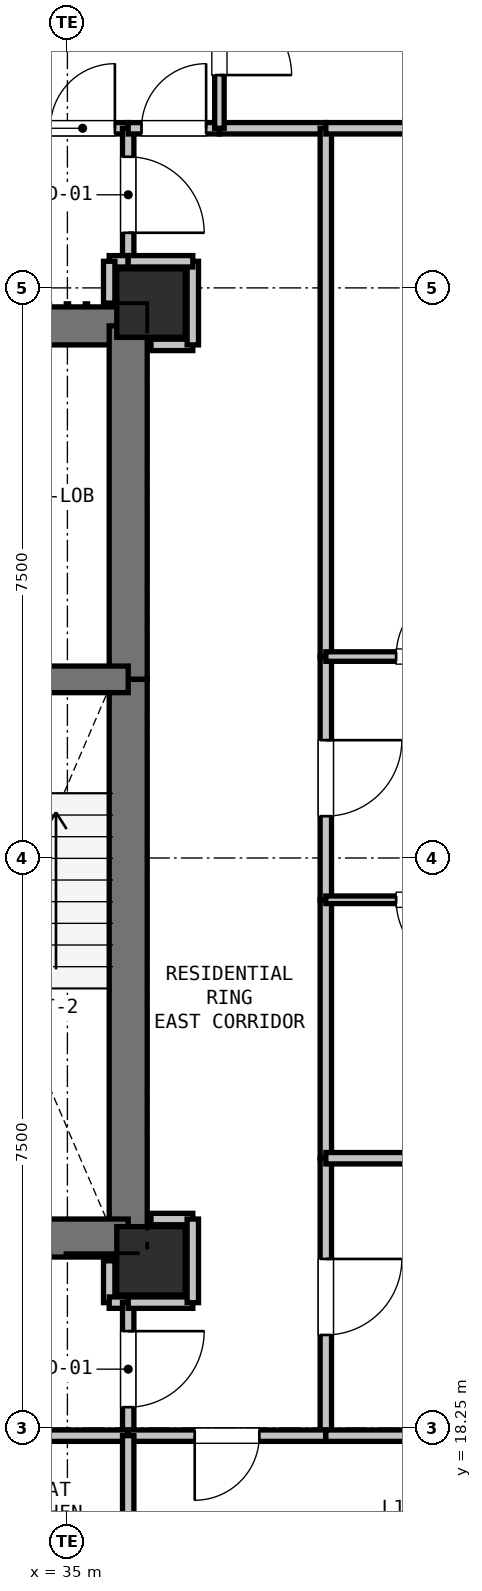
"""IFC4 building model, lengths in metres.
Left out: names, types, materials, properties, quantities, classifications, styles, units other than length and angle.
Written with IfcOpenShell. Run it as: python <this file> out.ifc"""

import sys

from ifc_helpers import new_model, si_unit, direction, frame, frame_2d, origin, origin_2d, place, context, subcontext, project, spatial, rectangle, extrude, element, fill, save


model = new_model("IFC4")
c1 = context("Model", 3, precision=1e-05, world=origin(), true_north=direction((0.0, 1.0)))
c2 = subcontext(c1, "Body", "Model", "MODEL_VIEW")
j1 = project(units=[si_unit("LENGTHUNIT", "METRE"), si_unit("PLANEANGLEUNIT", "RADIAN")], contexts=[c1])
p1 = place(None, origin())
s1 = spatial("IfcSite", under=j1, at=p1, CompositionType="ELEMENT")
p2 = place(p1, origin())
s2 = spatial("IfcBuilding", under=s1, at=p2, CompositionType="ELEMENT")
p3 = place(p2, frame((0.0, 0.0, 55.5)))
s3 = spatial("IfcBuildingStorey", under=s2, at=p3, CompositionType="ELEMENT", Elevation=55.5)
for number, where, z_axis, x_axis in (
    (1, (36.1, 33.05, 0.0), (0.0, 0.0, 1.0), (1.0, 0.0, 0.0)),
    (2, (36.1, 20.45, 0.0), (0.0, 0.0, 1.0), (1.0, 0.0, 0.0)),
):
    element("IfcColumn", number, at=place(p3, frame(where, z_axis=z_axis, x_axis=x_axis)), inside=s3, PredefinedType="COLUMN", context=c2, shape_type="SweptSolid", body=[
        extrude(rectangle(XDim=0.9, YDim=0.9, at=origin_2d()), origin(), (0.0, 0.0, 1.0), 3.3),
    ])
p4 = place(p3, frame((32.35, 32.75, 0.0), z_axis=(0.0, 0.0, 1.0), x_axis=(1.0, 0.0, 0.0)))
e3 = element("IfcWall", 3, at=p4, inside=s3, PredefinedType="SHEAR", context=c2, shape_type="SweptSolid", body=[
    extrude(rectangle(XDim=3.45, YDim=0.5, at=frame_2d((1.725, 0.0))), origin(), (0.0, 0.0, 1.0), 3.04),
])
p5 = place(p4, frame((0.65, 0.0, 0.0)))
e4 = element("IfcOpeningElement", 4, at=p5, cuts=e3, PredefinedType="OPENING", context=c2, shape_type="SweptSolid", body=[
    extrude(rectangle(XDim=1.15, YDim=2.15, at=frame_2d((0.575, 1.075))), frame((0.0, 0.26, 0.0), z_axis=(0.0, -1.0, 0.0), x_axis=(1.0, 0.0, 0.0)), (0.0, 0.0, 1.0), 0.52),
])
p6 = place(p3, frame((35.8, 32.75, 0.0), z_axis=(0.0, 0.0, 1.0), x_axis=(0.0, -1.0, 0.0)))
e5 = element("IfcWall", 5, at=p6, inside=s3, PredefinedType="SHEAR", context=c2, shape_type="SweptSolid", body=[
    extrude(rectangle(XDim=4.65, YDim=0.5, at=frame_2d((2.325, 0.0))), origin(), (0.0, 0.0, 1.0), 3.04),
])
p7 = place(p3, frame((35.8, 28.1, 0.0), z_axis=(0.0, 0.0, 1.0), x_axis=(0.0, -1.0, 0.0)))
e6 = element("IfcWall", 6, at=p7, inside=s3, PredefinedType="SHEAR", context=c2, shape_type="SweptSolid", body=[
    extrude(rectangle(XDim=7.35, YDim=0.5, at=frame_2d((3.675, 0.0))), origin(), (0.0, 0.0, 1.0), 3.04),
])
p8 = place(p3, frame((35.8, 20.75, 0.0), z_axis=(0.0, 0.0, 1.0), x_axis=(-1.0, 0.0, 0.0)))
e7 = element("IfcWall", 7, at=p8, inside=s3, PredefinedType="SHEAR", context=c2, shape_type="SweptSolid", body=[
    extrude(rectangle(XDim=3.45, YDim=0.5, at=frame_2d((1.725, 0.0))), origin(), (0.0, 0.0, 1.0), 3.04),
])
p9 = place(p3, frame((32.35, 28.1, 0.0), z_axis=(0.0, 0.0, 1.0), x_axis=(1.0, 0.0, 0.0)))
e8 = element("IfcWall", 8, at=p9, inside=s3, PredefinedType="SHEAR", context=c2, shape_type="SweptSolid", body=[
    extrude(rectangle(XDim=3.45, YDim=0.35, at=frame_2d((1.725, 0.0))), origin(), (0.0, 0.0, 1.0), 3.04),
])
p10 = place(p9, frame((1.15, 0.0, 0.0)))
e9 = element("IfcOpeningElement", 9, at=p10, cuts=e8, PredefinedType="OPENING", context=c2, shape_type="SweptSolid", body=[
    extrude(rectangle(XDim=1.15, YDim=2.15, at=frame_2d((0.575, 1.075))), frame((0.0, 0.185, 0.0), z_axis=(0.0, -1.0, 0.0), x_axis=(1.0, 0.0, 0.0)), (0.0, 0.0, 1.0), 0.37),
])
p11 = place(p3, frame((35.55, 20.45, 0.0), z_axis=(0.0, 0.0, 1.0), x_axis=(0.0, -1.0, 0.0)))
e10 = element("IfcWall", 10, at=p11, inside=s3, PredefinedType="PARTITIONING", context=c2, shape_type="SweptSolid", body=[
    extrude(rectangle(XDim=0.55, YDim=0.15, at=frame_2d((0.275, 0.0))), origin(), (0.0, 0.0, 1.0), 2.488),
])
p12 = place(p3, frame((35.55, 19.9, 0.0), z_axis=(0.0, 0.0, 1.0), x_axis=(1.0, 0.0, 0.0)))
e11 = element("IfcWall", 11, at=p12, inside=s3, PredefinedType="PARTITIONING", context=c2, shape_type="SweptSolid", body=[
    extrude(rectangle(XDim=0.25, YDim=0.15, at=frame_2d((0.125, 0.0))), origin(), (0.0, 0.0, 1.0), 3.04),
])
p13 = place(p3, frame((35.8, 19.9, 0.0), z_axis=(0.0, 0.0, 1.0), x_axis=(0.0, -1.0, 0.0)))
e12 = element("IfcWall", 12, at=p13, inside=s3, PredefinedType="PARTITIONING", context=c2, shape_type="SweptSolid", body=[
    extrude(rectangle(XDim=1.75, YDim=0.15, at=frame_2d((0.875, 0.0))), origin(), (0.0, 0.0, 1.0), 3.04),
])
p14 = place(p13, frame((0.375, 0.0, 0.0)))
e13 = element("IfcOpeningElement", 13, at=p14, cuts=e12, PredefinedType="OPENING", context=c2, shape_type="SweptSolid", body=[
    extrude(rectangle(XDim=1.0, YDim=2.15, at=frame_2d((0.5, 1.075))), frame((0.0, 0.085, 0.0), z_axis=(0.0, -1.0, 0.0), x_axis=(1.0, 0.0, 0.0)), (0.0, 0.0, 1.0), 0.17),
])
p15 = place(p3, frame((35.8, 18.15, 0.0), z_axis=(0.0, 0.0, 1.0), x_axis=(-1.0, 0.0, 0.0)))
e14 = element("IfcWall", 14, at=p15, inside=s3, PredefinedType="PARTITIONING", context=c2, shape_type="SweptSolid", body=[
    extrude(rectangle(XDim=3.6, YDim=0.15, at=frame_2d((1.8, 0.0))), origin(), (0.0, 0.0, 1.0), 3.04),
])
p16 = place(p3, frame((34.6, 35.35, 0.0), z_axis=(0.0, 0.0, 1.0), x_axis=(1.0, 0.0, 0.0)))
e15 = element("IfcWall", 15, at=p16, inside=s3, PredefinedType="PARTITIONING", context=c2, shape_type="SweptSolid", body=[
    extrude(rectangle(XDim=1.2, YDim=0.15, at=frame_2d((0.6, 0.0))), origin(), (0.0, 0.0, 1.0), 3.04),
])
p17 = place(p16, frame((0.175, 0.0, 0.0)))
e16 = element("IfcOpeningElement", 16, at=p17, cuts=e15, PredefinedType="OPENING", context=c2, shape_type="SweptSolid", body=[
    extrude(rectangle(XDim=0.85, YDim=2.1, at=frame_2d((0.425, 1.05))), frame((0.0, 0.085, 0.0), z_axis=(0.0, -1.0, 0.0), x_axis=(1.0, 0.0, 0.0)), (0.0, 0.0, 1.0), 0.17),
])
p18 = place(p3, frame((35.8, 35.35, 0.0), z_axis=(0.0, 0.0, 1.0), x_axis=(0.0, -1.0, 0.0)))
e17 = element("IfcWall", 17, at=p18, inside=s3, PredefinedType="PARTITIONING", context=c2, shape_type="SweptSolid", body=[
    extrude(rectangle(XDim=1.75, YDim=0.15, at=frame_2d((0.875, 0.0))), origin(), (0.0, 0.0, 1.0), 3.04),
])
p19 = place(p18, frame((0.375, 0.0, 0.0)))
e18 = element("IfcOpeningElement", 18, at=p19, cuts=e17, PredefinedType="OPENING", context=c2, shape_type="SweptSolid", body=[
    extrude(rectangle(XDim=1.0, YDim=2.15, at=frame_2d((0.5, 1.075))), frame((0.0, 0.085, 0.0), z_axis=(0.0, -1.0, 0.0), x_axis=(1.0, 0.0, 0.0)), (0.0, 0.0, 1.0), 0.17),
])
p20 = place(p3, frame((35.8, 33.6, 0.0), z_axis=(0.0, 0.0, 1.0), x_axis=(-1.0, 0.0, 0.0)))
e19 = element("IfcWall", 19, at=p20, inside=s3, PredefinedType="PARTITIONING", context=c2, shape_type="SweptSolid", body=[
    extrude(rectangle(XDim=0.25, YDim=0.15, at=frame_2d((0.125, 0.0))), origin(), (0.0, 0.0, 1.0), 3.04),
])
p21 = place(p3, frame((35.55, 33.6, 0.0), z_axis=(0.0, 0.0, 1.0), x_axis=(0.0, -1.0, 0.0)))
e20 = element("IfcWall", 20, at=p21, inside=s3, PredefinedType="PARTITIONING", context=c2, shape_type="SweptSolid", body=[
    extrude(rectangle(XDim=0.55, YDim=0.15, at=frame_2d((0.275, 0.0))), origin(), (0.0, 0.0, 1.0), 2.488),
])
for number, where, z_axis, x_axis in (
    (21, (36.65, 21.0, 0.0), (0.0, 0.0, 1.0), (-1.0, 0.0, 0.0)),
    (22, (36.1, 32.5, 0.0), (0.0, 0.0, 1.0), (1.0, 0.0, 0.0)),
):
    element("IfcWall", number, at=place(p3, frame(where, z_axis=z_axis, x_axis=x_axis)), inside=s3, PredefinedType="PARTITIONING", context=c2, shape_type="SweptSolid", body=[
        extrude(rectangle(XDim=0.55, YDim=0.15, at=frame_2d((0.275, 0.0))), origin(), (0.0, 0.0, 1.0), 2.488),
    ])
p22 = place(p3, frame((36.65, 32.5, 0.0), z_axis=(0.0, 0.0, 1.0), x_axis=(0.0, 1.0, 0.0)))
e23 = element("IfcWall", 23, at=p22, inside=s3, PredefinedType="PARTITIONING", context=c2, shape_type="SweptSolid", body=[
    extrude(rectangle(XDim=1.1, YDim=0.15, at=frame_2d((0.55, 0.0))), origin(), (0.0, 0.0, 1.0), 2.337),
])
p23 = place(p3, frame((36.65, 33.6, 0.0), z_axis=(0.0, 0.0, 1.0), x_axis=(-1.0, 0.0, 0.0)))
e24 = element("IfcWall", 24, at=p23, inside=s3, PredefinedType="PARTITIONING", context=c2, shape_type="SweptSolid", body=[
    extrude(rectangle(XDim=0.85, YDim=0.15, at=frame_2d((0.425, 0.0))), origin(), (0.0, 0.0, 1.0), 2.337),
])
p24 = place(p3, frame((35.8, 35.35, 0.0), z_axis=(0.0, 0.0, 1.0), x_axis=(1.0, 0.0, 0.0)))
e25 = element("IfcWall", 25, at=p24, inside=s3, PredefinedType="PARTITIONING", context=c2, shape_type="SweptSolid", body=[
    extrude(rectangle(XDim=1.2, YDim=0.15, at=frame_2d((0.6, 0.0))), origin(), (0.0, 0.0, 1.0), 2.337),
])
p25 = place(p24, frame((0.175, 0.0, 0.0)))
e26 = element("IfcOpeningElement", 26, at=p25, cuts=e25, PredefinedType="OPENING", context=c2, shape_type="SweptSolid", body=[
    extrude(rectangle(XDim=0.85, YDim=2.1, at=frame_2d((0.425, 1.05))), frame((0.0, 0.085, 0.0), z_axis=(0.0, -1.0, 0.0), x_axis=(1.0, 0.0, 0.0)), (0.0, 0.0, 1.0), 0.17),
])
p26 = place(p3, frame((37.0, 35.35, 0.0), z_axis=(0.0, 0.0, 1.0), x_axis=(1.0, 0.0, 0.0)))
e27 = element("IfcWall", 27, at=p26, inside=s3, PredefinedType="PARTITIONING", context=c2, shape_type="SweptSolid", body=[
    extrude(rectangle(XDim=1.4, YDim=0.15, at=frame_2d((0.7, 0.0))), origin(), (0.0, 0.0, 1.0), 2.337),
])
p27 = place(p3, frame((38.4, 35.35, 0.0), z_axis=(0.0, 0.0, 1.0), x_axis=(0.0, -1.0, 0.0)))
e28 = element("IfcWall", 28, at=p27, inside=s3, PredefinedType="PARTITIONING", context=c2, shape_type="SweptSolid", body=[
    extrude(rectangle(XDim=6.95, YDim=0.15, at=frame_2d((3.475, 0.0))), origin(), (0.0, 0.0, 1.0), 2.337),
])
p28 = place(p3, frame((38.4, 28.4, 0.0), z_axis=(0.0, 0.0, 1.0), x_axis=(0.0, -1.0, 0.0)))
e29 = element("IfcWall", 29, at=p28, inside=s3, PredefinedType="PARTITIONING", context=c2, shape_type="SweptSolid", body=[
    extrude(rectangle(XDim=3.2, YDim=0.15, at=frame_2d((1.6, 0.0))), origin(), (0.0, 0.0, 1.0), 3.04),
])
p29 = place(p28, frame((1.1, 0.0, 0.0)))
e30 = element("IfcOpeningElement", 30, at=p29, cuts=e29, PredefinedType="OPENING", context=c2, shape_type="SweptSolid", body=[
    extrude(rectangle(XDim=1.0, YDim=2.15, at=frame_2d((0.5, 1.075))), frame((0.0, 0.085, 0.0), z_axis=(0.0, -1.0, 0.0), x_axis=(1.0, 0.0, 0.0)), (0.0, 0.0, 1.0), 0.17),
])
p30 = place(p3, frame((38.4, 25.2, 0.0), z_axis=(0.0, 0.0, 1.0), x_axis=(0.0, -1.0, 0.0)))
e31 = element("IfcWall", 31, at=p30, inside=s3, PredefinedType="PARTITIONING", context=c2, shape_type="SweptSolid", body=[
    extrude(rectangle(XDim=3.4, YDim=0.15, at=frame_2d((1.7, 0.0))), origin(), (0.0, 0.0, 1.0), 3.04),
])
p31 = place(p3, frame((38.4, 21.8, 0.0), z_axis=(0.0, 0.0, 1.0), x_axis=(0.0, -1.0, 0.0)))
e32 = element("IfcWall", 32, at=p31, inside=s3, PredefinedType="PARTITIONING", context=c2, shape_type="SweptSolid", body=[
    extrude(rectangle(XDim=3.65, YDim=0.15, at=frame_2d((1.825, 0.0))), origin(), (0.0, 0.0, 1.0), 3.04),
])
p32 = place(p31, frame((1.325, 0.0, 0.0)))
e33 = element("IfcOpeningElement", 33, at=p32, cuts=e32, PredefinedType="OPENING", context=c2, shape_type="SweptSolid", body=[
    extrude(rectangle(XDim=1.0, YDim=2.15, at=frame_2d((0.5, 1.075))), frame((0.0, 0.085, 0.0), z_axis=(0.0, -1.0, 0.0), x_axis=(1.0, 0.0, 0.0)), (0.0, 0.0, 1.0), 0.17),
])
p33 = place(p3, frame((38.4, 18.15, 0.0), z_axis=(0.0, 0.0, 1.0), x_axis=(-1.0, 0.0, 0.0)))
e34 = element("IfcWall", 34, at=p33, inside=s3, PredefinedType="PARTITIONING", context=c2, shape_type="SweptSolid", body=[
    extrude(rectangle(XDim=2.6, YDim=0.15, at=frame_2d((1.3, 0.0))), origin(), (0.0, 0.0, 1.0), 2.337),
])
p34 = place(p33, frame((0.875, 0.0, 0.0)))
e35 = element("IfcOpeningElement", 35, at=p34, cuts=e34, PredefinedType="OPENING", context=c2, shape_type="SweptSolid", body=[
    extrude(rectangle(XDim=0.85, YDim=2.1, at=frame_2d((0.425, 1.05))), frame((0.0, 0.085, 0.0), z_axis=(0.0, -1.0, 0.0), x_axis=(1.0, 0.0, 0.0)), (0.0, 0.0, 1.0), 0.17),
])
p35 = place(p3, frame((35.8, 19.9, 0.0), z_axis=(0.0, 0.0, 1.0), x_axis=(1.0, 0.0, 0.0)))
e36 = element("IfcWall", 36, at=p35, inside=s3, PredefinedType="PARTITIONING", context=c2, shape_type="SweptSolid", body=[
    extrude(rectangle(XDim=0.85, YDim=0.15, at=frame_2d((0.425, 0.0))), origin(), (0.0, 0.0, 1.0), 2.337),
])
p36 = place(p3, frame((36.65, 19.9, 0.0), z_axis=(0.0, 0.0, 1.0), x_axis=(0.0, 1.0, 0.0)))
e37 = element("IfcWall", 37, at=p36, inside=s3, PredefinedType="PARTITIONING", context=c2, shape_type="SweptSolid", body=[
    extrude(rectangle(XDim=1.1, YDim=0.15, at=frame_2d((0.55, 0.0))), origin(), (0.0, 0.0, 1.0), 3.04),
])
p37 = place(p3, frame((37.0, 37.7, 0.0), z_axis=(0.0, 0.0, 1.0), x_axis=(0.0, -1.0, 0.0)))
e38 = element("IfcWall", 38, at=p37, inside=s3, PredefinedType="PARTITIONING", context=c2, shape_type="SweptSolid", body=[
    extrude(rectangle(XDim=2.35, YDim=0.125, at=frame_2d((1.175, 0.0))), origin(), (0.0, 0.0, 1.0), 2.337),
])
p38 = place(p37, frame((0.7, 0.0, 0.0)))
e39 = element("IfcOpeningElement", 39, at=p38, cuts=e38, PredefinedType="OPENING", context=c2, shape_type="SweptSolid", body=[
    extrude(rectangle(XDim=0.95, YDim=2.1, at=frame_2d((0.475, 1.05))), frame((0.0, 0.073, 0.0), z_axis=(0.0, -1.0, 0.0), x_axis=(1.0, 0.0, 0.0)), (0.0, 0.0, 1.0), 0.145),
])
p39 = place(p3, frame((41.2, 25.2, 0.0), z_axis=(0.0, 0.0, 1.0), x_axis=(-1.0, 0.0, 0.0)))
e40 = element("IfcWall", 40, at=p39, inside=s3, PredefinedType="PARTITIONING", context=c2, shape_type="SweptSolid", body=[
    extrude(rectangle(XDim=2.8, YDim=0.1, at=frame_2d((1.4, 0.0))), origin(), (0.0, 0.0, 1.0), 3.04),
])
p40 = place(p39, frame((0.925, 0.0, 0.0)))
e41 = element("IfcOpeningElement", 41, at=p40, cuts=e40, PredefinedType="OPENING", context=c2, shape_type="SweptSolid", body=[
    extrude(rectangle(XDim=0.95, YDim=2.1, at=frame_2d((0.475, 1.05))), frame((0.0, 0.06, 0.0), z_axis=(0.0, -1.0, 0.0), x_axis=(1.0, 0.0, 0.0)), (0.0, 0.0, 1.0), 0.12),
])
p41 = place(p3, frame((38.4, 28.4, 0.0), z_axis=(0.0, 0.0, 1.0), x_axis=(1.0, 0.0, 0.0)))
e42 = element("IfcWall", 42, at=p41, inside=s3, PredefinedType="PARTITIONING", context=c2, shape_type="SweptSolid", body=[
    extrude(rectangle(XDim=2.8, YDim=0.125, at=frame_2d((1.4, 0.0))), origin(), (0.0, 0.0, 1.0), 3.04),
])
p42 = place(p41, frame((0.925, 0.0, 0.0)))
e43 = element("IfcOpeningElement", 43, at=p42, cuts=e42, PredefinedType="OPENING", context=c2, shape_type="SweptSolid", body=[
    extrude(rectangle(XDim=0.95, YDim=2.1, at=frame_2d((0.475, 1.05))), frame((0.0, 0.073, 0.0), z_axis=(0.0, -1.0, 0.0), x_axis=(1.0, 0.0, 0.0)), (0.0, 0.0, 1.0), 0.145),
])
p43 = place(p3, frame((43.688, 35.35, 0.0), z_axis=(0.0, 0.0, 1.0), x_axis=(-1.0, 0.0, 0.0)))
e44 = element("IfcWall", 44, at=p43, inside=s3, PredefinedType="PARTITIONING", context=c2, shape_type="SweptSolid", body=[
    extrude(rectangle(XDim=5.289, YDim=0.15, at=frame_2d((2.644, 0.0))), origin(), (0.0, 0.0, 1.0), 2.337),
])
p44 = place(p3, frame((35.8, 18.15, 0.0), z_axis=(0.0, 0.0, 1.0), x_axis=(0.0, -1.0, 0.0)))
e45 = element("IfcWall", 45, at=p44, inside=s3, PredefinedType="PARTITIONING", context=c2, shape_type="SweptSolid", body=[
    extrude(rectangle(XDim=2.55, YDim=0.15, at=frame_2d((1.275, 0.0))), origin(), (0.0, 0.0, 1.0), 3.04),
])
p45 = place(p3, frame((43.814, 21.8, 0.0), z_axis=(0.0, 0.0, 1.0), x_axis=(-1.0, 0.0, 0.0)))
e46 = element("IfcWall", 46, at=p45, inside=s3, PredefinedType="PARTITIONING", context=c2, shape_type="SweptSolid", body=[
    extrude(rectangle(XDim=5.414, YDim=0.15, at=frame_2d((2.707, 0.0))), origin(), (0.0, 0.0, 1.0), 2.365),
])
p46 = place(p3, frame((38.4, 18.15, 0.0), z_axis=(0.0, 0.0, 1.0), x_axis=(1.0, 0.0, 0.0)))
e47 = element("IfcWall", 47, at=p46, inside=s3, PredefinedType="PARTITIONING", context=c2, shape_type="SweptSolid", body=[
    extrude(rectangle(XDim=5.289, YDim=0.15, at=frame_2d((2.644, 0.0))), origin(), (0.0, 0.0, 1.0), 2.365),
])
p47 = place(p14, origin())
e48 = element("IfcDoor", 48, at=p47, inside=s3, OperationType="SINGLE_SWING_LEFT", PredefinedType="DOOR", context=c2, shape_type="SweptSolid", body=[
    extrude(rectangle(XDim=1.0, YDim=2.15, at=frame_2d((0.5, 1.075))), frame((0.0, 0.025, 0.0), z_axis=(0.0, -1.0, 0.0), x_axis=(1.0, 0.0, 0.0)), (0.0, 0.0, 1.0), 0.05),
])
fill(e13, e48)
p48 = place(p19, origin())
e49 = element("IfcDoor", 49, at=p48, inside=s3, OperationType="SINGLE_SWING_RIGHT", PredefinedType="DOOR", context=c2, shape_type="SweptSolid", body=[
    extrude(rectangle(XDim=1.0, YDim=2.15, at=frame_2d((0.5, 1.075))), frame((0.0, 0.025, 0.0), z_axis=(0.0, -1.0, 0.0), x_axis=(1.0, 0.0, 0.0)), (0.0, 0.0, 1.0), 0.05),
])
fill(e18, e49)
p49 = place(p17, origin())
e50 = element("IfcDoor", 50, at=p49, inside=s3, OperationType="SINGLE_SWING_RIGHT", PredefinedType="DOOR", context=c2, shape_type="SweptSolid", body=[
    extrude(rectangle(XDim=0.85, YDim=2.1, at=frame_2d((0.425, 1.05))), frame((0.0, 0.025, 0.0), z_axis=(0.0, -1.0, 0.0), x_axis=(1.0, 0.0, 0.0)), (0.0, 0.0, 1.0), 0.05),
])
fill(e16, e50)
p50 = place(p25, origin())
e51 = element("IfcDoor", 51, at=p50, inside=s3, OperationType="SINGLE_SWING_RIGHT", PredefinedType="DOOR", context=c2, shape_type="SweptSolid", body=[
    extrude(rectangle(XDim=0.85, YDim=2.1, at=frame_2d((0.425, 1.05))), frame((0.0, 0.025, 0.0), z_axis=(0.0, -1.0, 0.0), x_axis=(1.0, 0.0, 0.0)), (0.0, 0.0, 1.0), 0.05),
])
fill(e26, e51)
p51 = place(p29, origin())
e52 = element("IfcDoor", 52, at=p51, inside=s3, OperationType="SINGLE_SWING_LEFT", PredefinedType="DOOR", context=c2, shape_type="SweptSolid", body=[
    extrude(rectangle(XDim=1.0, YDim=2.15, at=frame_2d((0.5, 1.075))), frame((0.0, 0.025, 0.0), z_axis=(0.0, -1.0, 0.0), x_axis=(1.0, 0.0, 0.0)), (0.0, 0.0, 1.0), 0.05),
])
fill(e30, e52)
p52 = place(p34, origin())
e53 = element("IfcDoor", 53, at=p52, inside=s3, OperationType="SINGLE_SWING_RIGHT", PredefinedType="DOOR", context=c2, shape_type="SweptSolid", body=[
    extrude(rectangle(XDim=0.85, YDim=2.1, at=frame_2d((0.425, 1.05))), frame((0.0, 0.025, 0.0), z_axis=(0.0, -1.0, 0.0), x_axis=(1.0, 0.0, 0.0)), (0.0, 0.0, 1.0), 0.05),
])
fill(e35, e53)
p53 = place(p32, origin())
e54 = element("IfcDoor", 54, at=p53, inside=s3, OperationType="SINGLE_SWING_LEFT", PredefinedType="DOOR", context=c2, shape_type="SweptSolid", body=[
    extrude(rectangle(XDim=1.0, YDim=2.15, at=frame_2d((0.5, 1.075))), frame((0.0, 0.025, 0.0), z_axis=(0.0, -1.0, 0.0), x_axis=(1.0, 0.0, 0.0)), (0.0, 0.0, 1.0), 0.05),
])
fill(e33, e54)
p54 = place(p38, origin())
e55 = element("IfcDoor", 55, at=p54, inside=s3, OperationType="SINGLE_SWING_RIGHT", PredefinedType="DOOR", context=c2, shape_type="SweptSolid", body=[
    extrude(rectangle(XDim=0.95, YDim=2.1, at=frame_2d((0.475, 1.05))), frame((0.0, 0.025, 0.0), z_axis=(0.0, -1.0, 0.0), x_axis=(1.0, 0.0, 0.0)), (0.0, 0.0, 1.0), 0.05),
])
fill(e39, e55)
p55 = place(p40, origin())
e56 = element("IfcDoor", 56, at=p55, inside=s3, OperationType="SINGLE_SWING_LEFT", PredefinedType="DOOR", context=c2, shape_type="SweptSolid", body=[
    extrude(rectangle(XDim=0.95, YDim=2.1, at=frame_2d((0.475, 1.05))), frame((0.0, 0.025, 0.0), z_axis=(0.0, -1.0, 0.0), x_axis=(1.0, 0.0, 0.0)), (0.0, 0.0, 1.0), 0.05),
])
fill(e41, e56)
p56 = place(p42, origin())
e57 = element("IfcDoor", 57, at=p56, inside=s3, OperationType="SINGLE_SWING_RIGHT", PredefinedType="DOOR", context=c2, shape_type="SweptSolid", body=[
    extrude(rectangle(XDim=0.95, YDim=2.1, at=frame_2d((0.475, 1.05))), frame((0.0, 0.025, 0.0), z_axis=(0.0, -1.0, 0.0), x_axis=(1.0, 0.0, 0.0)), (0.0, 0.0, 1.0), 0.05),
])
fill(e43, e57)
save(model, sys.argv[1])
